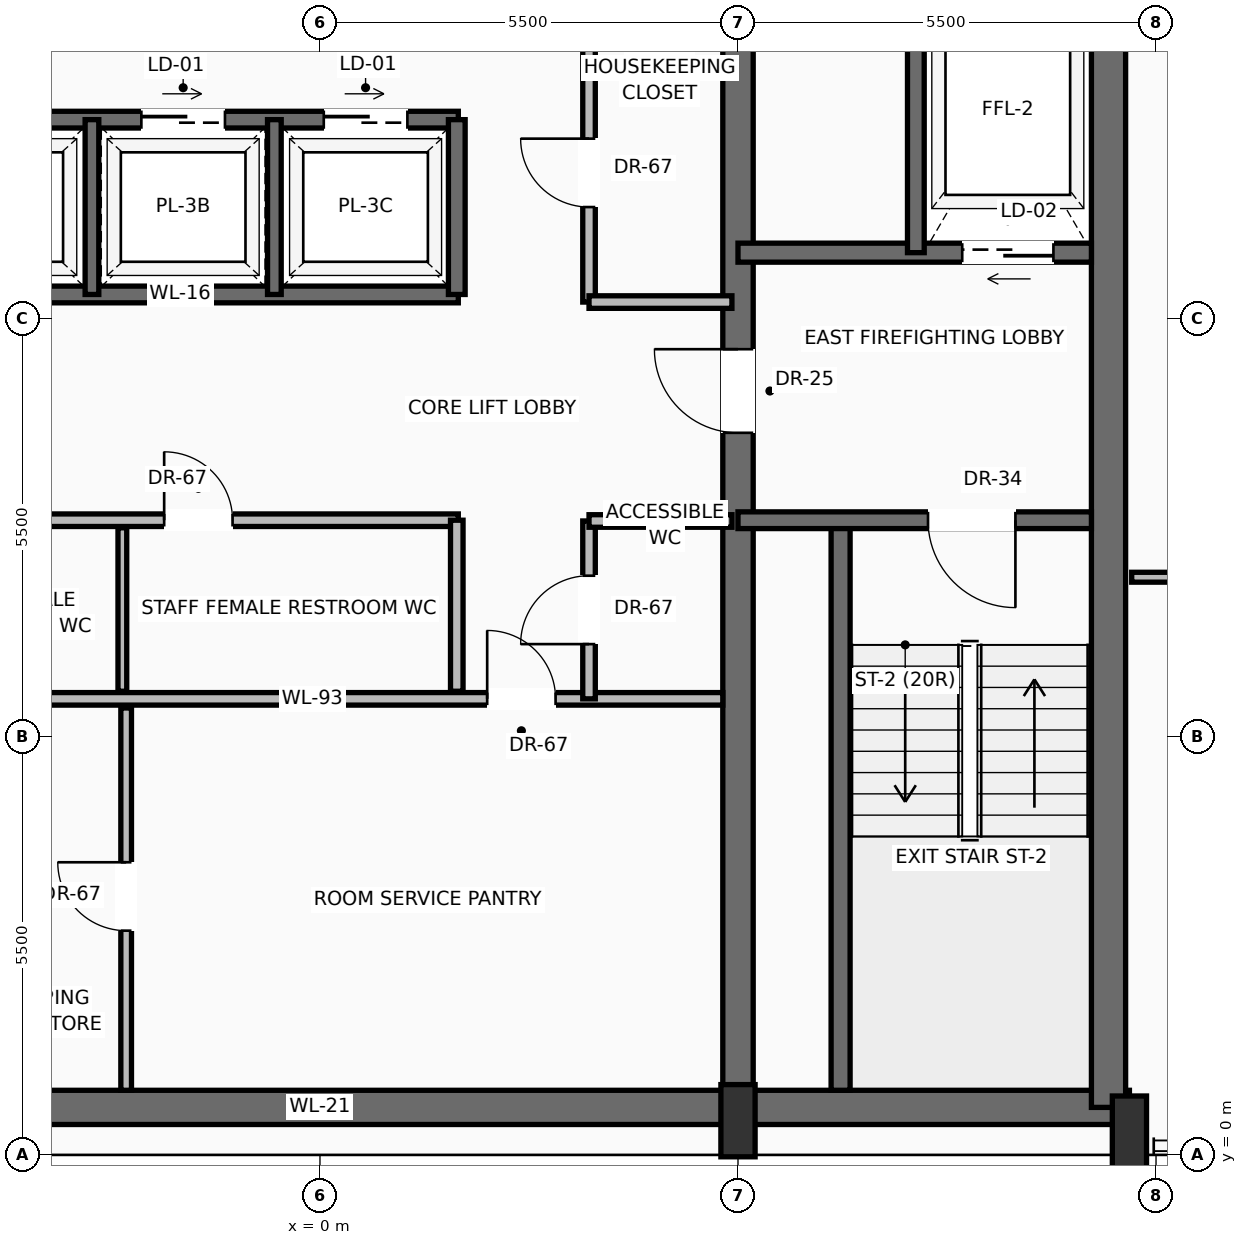
"""IFC4 building model, lengths in metres.
Left out: names, types, materials, properties, quantities, classifications, styles, units other than length and angle.
Written with IfcOpenShell. Run it as: python <this file> out.ifc"""

import sys

from ifc_helpers import new_model, si_unit, direction, frame, frame_2d, origin, origin_2d, place, context, subcontext, project, spatial, rectangle, extrude, source, transform, mapped, element, fill, save


model = new_model("IFC4")
c1 = context("Model", 3, precision=1e-05, world=origin(), true_north=direction((0.0, 1.0)))
c2 = subcontext(c1, "Body", "Model", "MODEL_VIEW")
j1 = project(units=[si_unit("LENGTHUNIT", "METRE"), si_unit("PLANEANGLEUNIT", "RADIAN")], contexts=[c1])
p1 = place(None, origin())
s1 = spatial("IfcSite", under=j1, at=p1, CompositionType="ELEMENT")
p2 = place(p1, origin())
s2 = spatial("IfcBuilding", under=s1, at=p2, CompositionType="ELEMENT")
p3 = place(p2, frame((0.0, 0.0, 262.65)))
s3 = spatial("IfcBuildingStorey", under=s2, at=p3, CompositionType="ELEMENT", Elevation=262.65)
p4 = place(p3, frame((-10.65, 0.625, 0.0), z_axis=(0.0, 0.0, 1.0), x_axis=(1.0, 0.0, 0.0)))
e1 = element("IfcWall", 1, at=p4, inside=s3, PredefinedType="SHEAR", context=c2, shape_type="SweptSolid", body=[
    extrude(rectangle(XDim=21.3, YDim=0.45, at=frame_2d((10.65, 0.0))), origin(), (0.0, 0.0, 1.0), 3.24),
])
p5 = place(p3, frame((10.375, 0.625, 0.0), z_axis=(0.0, 0.0, 1.0), x_axis=(0.0, 1.0, 0.0)))
e2 = element("IfcWall", 2, at=p5, inside=s3, PredefinedType="SHEAR", context=c2, shape_type="SweptSolid", body=[
    extrude(rectangle(XDim=15.35, YDim=0.45, at=frame_2d((7.675, 0.0))), origin(), (0.0, 0.0, 1.0), 3.24),
])
p6 = place(p3, frame((5.5, 0.625, 0.0), z_axis=(0.0, 0.0, 1.0), x_axis=(0.0, 1.0, 0.0)))
e3 = element("IfcWall", 3, at=p6, inside=s3, PredefinedType="SHEAR", context=c2, shape_type="SweptSolid", body=[
    extrude(rectangle(XDim=15.35, YDim=0.4, at=frame_2d((7.675, 0.0))), origin(), (0.0, 0.0, 1.0), 3.24),
])
p7 = place(p6, frame((8.875, 0.0, 0.0)))
e4 = element("IfcOpeningElement", 4, at=p7, cuts=e3, PredefinedType="OPENING", context=c2, shape_type="SweptSolid", body=[
    extrude(rectangle(XDim=1.1, YDim=2.2, at=frame_2d((0.55, 1.1))), frame((0.0, 0.21, 0.0), z_axis=(0.0, -1.0, 0.0), x_axis=(1.0, 0.0, 0.0)), (0.0, 0.0, 1.0), 0.42),
])
m1 = source(origin(), c2, "Body", "SweptSolid", [
    extrude(rectangle(XDim=0.45, YDim=0.95, at=origin_2d()), origin(), (0.0, 0.0, 1.0), 3.45),
])
for number, where, z_axis, x_axis in (
    (5, (5.5, 0.45, 0.0), (0.0, 0.0, 1.0), (1.0, 0.0, 0.0)),
    (6, (10.65, 0.3, 0.0), (0.0, 0.0, 1.0), (1.0, 0.0, 0.0)),
):
    element("IfcColumn", number, at=place(p3, frame(where, z_axis=z_axis, x_axis=x_axis)), inside=s3, PredefinedType="PILASTER", context=c2, shape_type="MappedRepresentation", body=[
        mapped(m1, transform((0.0, 0.0, 0.0), scale=1.0)),
    ])
p8 = place(p3, frame((6.85, 0.85, 0.0), z_axis=(0.0, 0.0, 1.0), x_axis=(0.0, 1.0, 0.0)))
e7 = element("IfcWall", 7, at=p8, inside=s3, PredefinedType="SOLIDWALL", context=c2, shape_type="SweptSolid", body=[
    extrude(rectangle(XDim=7.5, YDim=0.25, at=frame_2d((3.75, 0.0))), origin(), (0.0, 0.0, 1.0), 3.24),
])
p9 = place(p3, frame((10.15, 8.35, 0.0), z_axis=(0.0, 0.0, 1.0), x_axis=(-1.0, 0.0, 0.0)))
e8 = element("IfcWall", 8, at=p9, inside=s3, PredefinedType="SOLIDWALL", context=c2, shape_type="SweptSolid", body=[
    extrude(rectangle(XDim=4.65, YDim=0.22, at=frame_2d((2.325, 0.0))), origin(), (0.0, 0.0, 1.0), 3.24),
])
p10 = place(p9, frame((1.0, 0.0, 0.0)))
e9 = element("IfcOpeningElement", 9, at=p10, cuts=e8, PredefinedType="OPENING", context=c2, shape_type="SweptSolid", body=[
    extrude(rectangle(XDim=1.15, YDim=2.2, at=frame_2d((0.575, 1.1))), frame((0.0, 0.12, 0.0), z_axis=(0.0, -1.0, 0.0), x_axis=(1.0, 0.0, 0.0)), (0.0, 0.0, 1.0), 0.24),
])
p11 = place(p3, frame((10.15, 11.87, 0.0), z_axis=(0.0, 0.0, 1.0), x_axis=(-1.0, 0.0, 0.0)))
e10 = element("IfcWall", 10, at=p11, inside=s3, PredefinedType="SOLIDWALL", context=c2, shape_type="SweptSolid", body=[
    extrude(rectangle(XDim=4.65, YDim=0.25, at=frame_2d((2.325, 0.0))), origin(), (0.0, 0.0, 1.0), 3.24),
])
p12 = place(p11, frame((0.5, 0.0, 0.0)))
e11 = element("IfcOpeningElement", 11, at=p12, cuts=e10, PredefinedType="OPENING", context=c2, shape_type="SweptSolid", body=[
    extrude(rectangle(XDim=1.2, YDim=2.25, at=frame_2d((0.6, 1.125))), frame((0.0, 0.135, 0.0), z_axis=(0.0, -1.0, 0.0), x_axis=(1.0, 0.0, 0.0)), (0.0, 0.0, 1.0), 0.27),
])
p13 = place(p3, frame((7.84, 11.87, 0.0), z_axis=(0.0, 0.0, 1.0), x_axis=(0.0, 1.0, 0.0)))
e12 = element("IfcWall", 12, at=p13, inside=s3, PredefinedType="SOLIDWALL", context=c2, shape_type="SweptSolid", body=[
    extrude(rectangle(XDim=3.88, YDim=0.22, at=frame_2d((1.94, 0.0))), origin(), (0.0, 0.0, 1.0), 3.24),
])
p14 = place(p3, frame((-5.5, 6.0, 0.0), z_axis=(0.0, 0.0, 1.0), x_axis=(1.0, 0.0, 0.0)))
e13 = element("IfcWall", 13, at=p14, inside=s3, PredefinedType="PARTITIONING", context=c2, shape_type="SweptSolid", body=[
    extrude(rectangle(XDim=10.8, YDim=0.165, at=frame_2d((5.4, 0.0))), origin(), (0.0, 0.0, 1.0), 3.232),
])
p15 = place(p14, frame((7.7, 0.0, 0.0)))
e14 = element("IfcOpeningElement", 14, at=p15, cuts=e13, PredefinedType="OPENING", context=c2, shape_type="SweptSolid", body=[
    extrude(rectangle(XDim=0.9, YDim=2.1, at=frame_2d((0.45, 1.05))), frame((0.0, 0.093, 0.0), z_axis=(0.0, -1.0, 0.0), x_axis=(1.0, 0.0, 0.0)), (0.0, 0.0, 1.0), 0.185),
])
p16 = place(p3, frame((-2.55, 0.85, 0.0), z_axis=(0.0, 0.0, 1.0), x_axis=(0.0, 1.0, 0.0)))
e15 = element("IfcWall", 15, at=p16, inside=s3, PredefinedType="PARTITIONING", context=c2, shape_type="SweptSolid", body=[
    extrude(rectangle(XDim=5.03, YDim=0.14, at=frame_2d((2.515, 0.0))), origin(), (0.0, 0.0, 1.0), 3.232),
])
p17 = place(p16, frame((2.1, 0.0, 0.0)))
e16 = element("IfcOpeningElement", 16, at=p17, cuts=e15, PredefinedType="OPENING", context=c2, shape_type="SweptSolid", body=[
    extrude(rectangle(XDim=0.9, YDim=2.1, at=frame_2d((0.45, 1.05))), frame((0.0, 0.08, 0.0), z_axis=(0.0, -1.0, 0.0), x_axis=(1.0, 0.0, 0.0)), (0.0, 0.0, 1.0), 0.16),
])
p18 = place(p3, frame((3.54, 6.0, 0.0), z_axis=(0.0, 0.0, 1.0), x_axis=(0.0, 1.0, 0.0)))
e17 = element("IfcWall", 17, at=p18, inside=s3, PredefinedType="PARTITIONING", context=c2, shape_type="SweptSolid", body=[
    extrude(rectangle(XDim=2.34, YDim=0.165, at=frame_2d((1.17, 0.0))), origin(), (0.0, 0.0, 1.0), 3.232),
])
p19 = place(p18, frame((0.72, 0.0, 0.0)))
e18 = element("IfcOpeningElement", 18, at=p19, cuts=e17, PredefinedType="OPENING", context=c2, shape_type="SweptSolid", body=[
    extrude(rectangle(XDim=0.9, YDim=2.1, at=frame_2d((0.45, 1.05))), frame((0.0, 0.093, 0.0), z_axis=(0.0, -1.0, 0.0), x_axis=(1.0, 0.0, 0.0)), (0.0, 0.0, 1.0), 0.185),
])
p20 = place(p3, frame((3.54, 8.34, 0.0), z_axis=(0.0, 0.0, 1.0), x_axis=(1.0, 0.0, 0.0)))
e19 = element("IfcWall", 19, at=p20, inside=s3, PredefinedType="PARTITIONING", context=c2, shape_type="SweptSolid", body=[
    extrude(rectangle(XDim=1.88, YDim=0.165, at=frame_2d((0.94, 0.0))), origin(), (0.0, 0.0, 1.0), 3.232),
])
p21 = place(p3, frame((-5.3, 8.35, 0.0), z_axis=(0.0, 0.0, 1.0), x_axis=(1.0, 0.0, 0.0)))
e20 = element("IfcWall", 20, at=p21, inside=s3, PredefinedType="PARTITIONING", context=c2, shape_type="SweptSolid", body=[
    extrude(rectangle(XDim=7.12, YDim=0.165, at=frame_2d((3.56, 0.0))), origin(), (0.0, 0.0, 1.0), 3.232),
])
p22 = place(p21, frame((0.85, 0.0, 0.0)))
e21 = element("IfcOpeningElement", 21, at=p22, cuts=e20, PredefinedType="OPENING", context=c2, shape_type="SweptSolid", body=[
    extrude(rectangle(XDim=0.9, YDim=2.1, at=frame_2d((0.45, 1.05))), frame((0.0, 0.093, 0.0), z_axis=(0.0, -1.0, 0.0), x_axis=(1.0, 0.0, 0.0)), (0.0, 0.0, 1.0), 0.185),
])
p23 = place(p21, frame((3.25, 0.0, 0.0)))
e22 = element("IfcOpeningElement", 22, at=p23, cuts=e20, PredefinedType="OPENING", context=c2, shape_type="SweptSolid", body=[
    extrude(rectangle(XDim=0.9, YDim=2.1, at=frame_2d((0.45, 1.05))), frame((0.0, 0.093, 0.0), z_axis=(0.0, -1.0, 0.0), x_axis=(1.0, 0.0, 0.0)), (0.0, 0.0, 1.0), 0.185),
])
p24 = place(p3, frame((1.8, 6.1, 0.0), z_axis=(0.0, 0.0, 1.0), x_axis=(0.0, 1.0, 0.0)))
e23 = element("IfcWall", 23, at=p24, inside=s3, PredefinedType="PARTITIONING", context=c2, shape_type="SweptSolid", body=[
    extrude(rectangle(XDim=2.25, YDim=0.165, at=frame_2d((1.125, 0.0))), origin(), (0.0, 0.0, 1.0), 3.232),
])
p25 = place(p3, frame((-2.6, 6.1, 0.0), z_axis=(0.0, 0.0, 1.0), x_axis=(0.0, 1.0, 0.0)))
e24 = element("IfcWall", 24, at=p25, inside=s3, PredefinedType="PARTITIONING", context=c2, shape_type="SweptSolid", body=[
    extrude(rectangle(XDim=2.15, YDim=0.115, at=frame_2d((1.075, 0.0))), origin(), (0.0, 0.0, 1.0), 3.232),
])
p26 = place(p3, frame((-5.5, 11.32, 0.0), z_axis=(0.0, 0.0, 1.0), x_axis=(1.0, 0.0, 0.0)))
e25 = element("IfcWall", 25, at=p26, inside=s3, PredefinedType="SOLIDWALL", context=c2, shape_type="SweptSolid", body=[
    extrude(rectangle(XDim=7.32, YDim=0.22, at=frame_2d((3.66, 0.0))), origin(), (0.0, 0.0, 1.0), 3.24),
])
p27 = place(p3, frame((-5.5, 13.62, 0.0), z_axis=(0.0, 0.0, 1.0), x_axis=(1.0, 0.0, 0.0)))
e26 = element("IfcWall", 26, at=p27, inside=s3, PredefinedType="SOLIDWALL", context=c2, shape_type="SweptSolid", body=[
    extrude(rectangle(XDim=7.32, YDim=0.22, at=frame_2d((3.66, 0.0))), origin(), (0.0, 0.0, 1.0), 3.24),
])
p28 = place(p27, frame((0.75, 0.0, 0.0)))
e27 = element("IfcOpeningElement", 27, at=p28, cuts=e26, PredefinedType="OPENING", context=c2, shape_type="SweptSolid", body=[
    extrude(rectangle(XDim=1.1, YDim=2.2, at=frame_2d((0.55, 1.1))), frame((0.0, 0.12, 0.0), z_axis=(0.0, -1.0, 0.0), x_axis=(1.0, 0.0, 0.0)), (0.0, 0.0, 1.0), 0.24),
])
p29 = place(p27, frame((3.15, 0.0, 0.0)))
e28 = element("IfcOpeningElement", 28, at=p29, cuts=e26, PredefinedType="OPENING", context=c2, shape_type="SweptSolid", body=[
    extrude(rectangle(XDim=1.1, YDim=2.2, at=frame_2d((0.55, 1.1))), frame((0.0, 0.12, 0.0), z_axis=(0.0, -1.0, 0.0), x_axis=(1.0, 0.0, 0.0)), (0.0, 0.0, 1.0), 0.24),
])
p30 = place(p27, frame((5.55, 0.0, 0.0)))
e29 = element("IfcOpeningElement", 29, at=p30, cuts=e26, PredefinedType="OPENING", context=c2, shape_type="SweptSolid", body=[
    extrude(rectangle(XDim=1.1, YDim=2.2, at=frame_2d((0.55, 1.1))), frame((0.0, 0.12, 0.0), z_axis=(0.0, -1.0, 0.0), x_axis=(1.0, 0.0, 0.0)), (0.0, 0.0, 1.0), 0.24),
])
p31 = place(p3, frame((1.8, 11.32, 0.0), z_axis=(0.0, 0.0, 1.0), x_axis=(0.0, 1.0, 0.0)))
e30 = element("IfcWall", 30, at=p31, inside=s3, PredefinedType="SOLIDWALL", context=c2, shape_type="SweptSolid", body=[
    extrude(rectangle(XDim=2.3, YDim=0.22, at=frame_2d((1.15, 0.0))), origin(), (0.0, 0.0, 1.0), 3.24),
])
for number, where, z_axis, x_axis in (
    (31, (-3.0, 11.32, 0.0), (0.0, 0.0, 1.0), (0.0, 1.0, 0.0)),
    (32, (-0.6, 11.32, 0.0), (0.0, 0.0, 1.0), (0.0, 1.0, 0.0)),
):
    element("IfcWall", number, at=place(p3, frame(where, z_axis=z_axis, x_axis=x_axis)), inside=s3, PredefinedType="SOLIDWALL", context=c2, shape_type="SweptSolid", body=[
        extrude(rectangle(XDim=2.3, YDim=0.18, at=frame_2d((1.15, 0.0))), origin(), (0.0, 0.0, 1.0), 3.24),
    ])
p32 = place(p3, frame((3.54, 11.22, 0.0), z_axis=(0.0, 0.0, 1.0), x_axis=(0.0, 1.0, 0.0)))
e33 = element("IfcWall", 33, at=p32, inside=s3, PredefinedType="PARTITIONING", context=c2, shape_type="SweptSolid", body=[
    extrude(rectangle(XDim=4.53, YDim=0.165, at=frame_2d((2.265, 0.0))), origin(), (0.0, 0.0, 1.0), 3.232),
])
p33 = place(p32, frame((1.25, 0.0, 0.0)))
e34 = element("IfcOpeningElement", 34, at=p33, cuts=e33, PredefinedType="OPENING", context=c2, shape_type="SweptSolid", body=[
    extrude(rectangle(XDim=0.9, YDim=2.1, at=frame_2d((0.45, 1.05))), frame((0.0, 0.093, 0.0), z_axis=(0.0, -1.0, 0.0), x_axis=(1.0, 0.0, 0.0)), (0.0, 0.0, 1.0), 0.185),
])
p34 = place(p3, frame((3.54, 11.22, 0.0), z_axis=(0.0, 0.0, 1.0), x_axis=(1.0, 0.0, 0.0)))
e35 = element("IfcWall", 35, at=p34, inside=s3, PredefinedType="PARTITIONING", context=c2, shape_type="SweptSolid", body=[
    extrude(rectangle(XDim=1.88, YDim=0.165, at=frame_2d((0.94, 0.0))), origin(), (0.0, 0.0, 1.0), 3.232),
])
p35 = place(p3, frame((10.68, 7.6, 0.0), z_axis=(0.0, 0.0, 1.0), x_axis=(1.0, 0.0, 0.0)))
e36 = element("IfcWall", 36, at=p35, inside=s3, PredefinedType="PARTITIONING", context=c2, shape_type="SweptSolid", body=[
    extrude(rectangle(XDim=12.147, YDim=0.13, at=frame_2d((6.074, 0.0))), origin(), (0.0, 0.0, 1.0), 3.232),
])
p36 = place(p35, frame((5.025, 0.0, 0.0)))
e37 = element("IfcOpeningElement", 37, at=p36, cuts=e36, PredefinedType="OPENING", context=c2, shape_type="SweptSolid", body=[
    extrude(rectangle(XDim=0.95, YDim=2.2, at=frame_2d((0.475, 1.1))), frame((0.0, 0.075, 0.0), z_axis=(0.0, -1.0, 0.0), x_axis=(1.0, 0.0, 0.0)), (0.0, 0.0, 1.0), 0.15),
])
m2 = source(origin(), c2, "Body", "SweptSolid", [
    extrude(rectangle(XDim=1.15, YDim=2.2, at=frame_2d((0.575, 1.1))), frame((0.0, 0.025, 0.0), z_axis=(0.0, -1.0, 0.0), x_axis=(1.0, 0.0, 0.0)), (0.0, 0.0, 1.0), 0.05),
])
p37 = place(p10, origin())
e38 = element("IfcDoor", 38, at=p37, inside=s3, OperationType="SINGLE_SWING_LEFT", PredefinedType="DOOR", context=c2, shape_type="MappedRepresentation", body=[
    mapped(m2, transform((0.0, 0.0, 0.0), scale=1.0)),
])
fill(e9, e38)
m3 = source(origin(), c2, "Body", "SweptSolid", [
    extrude(rectangle(XDim=1.1, YDim=2.2, at=frame_2d((0.55, 1.1))), frame((0.0, 0.025, 0.0), z_axis=(0.0, -1.0, 0.0), x_axis=(1.0, 0.0, 0.0)), (0.0, 0.0, 1.0), 0.05),
])
p38 = place(p7, origin())
e39 = element("IfcDoor", 39, at=p38, inside=s3, OperationType="SINGLE_SWING_RIGHT", PredefinedType="DOOR", context=c2, shape_type="MappedRepresentation", body=[
    mapped(m3, transform((0.0, 0.0, 0.0), scale=1.0)),
])
fill(e4, e39)
m4 = source(origin(), c2, "Body", "SweptSolid", [
    extrude(rectangle(XDim=1.2, YDim=2.25, at=frame_2d((0.6, 1.125))), frame((0.0, 0.025, 0.0), z_axis=(0.0, -1.0, 0.0), x_axis=(1.0, 0.0, 0.0)), (0.0, 0.0, 1.0), 0.05),
])
p39 = place(p12, origin())
e40 = element("IfcDoor", 40, at=p39, inside=s3, OperationType="SLIDING_TO_RIGHT", PredefinedType="DOOR", context=c2, shape_type="MappedRepresentation", body=[
    mapped(m4, transform((0.0, 0.0, 0.0), scale=1.0)),
])
fill(e11, e40)
m5 = source(origin(), c2, "Body", "SweptSolid", [
    extrude(rectangle(XDim=0.9, YDim=2.1, at=frame_2d((0.45, 1.05))), frame((0.0, 0.025, 0.0), z_axis=(0.0, -1.0, 0.0), x_axis=(1.0, 0.0, 0.0)), (0.0, 0.0, 1.0), 0.05),
])
p40 = place(p15, origin())
e41 = element("IfcDoor", 41, at=p40, inside=s3, OperationType="SINGLE_SWING_LEFT", PredefinedType="DOOR", context=c2, shape_type="MappedRepresentation", body=[
    mapped(m5, transform((0.0, 0.0, 0.0), scale=1.0)),
])
fill(e14, e41)
p41 = place(p17, origin())
e42 = element("IfcDoor", 42, at=p41, inside=s3, OperationType="SINGLE_SWING_RIGHT", PredefinedType="DOOR", context=c2, shape_type="MappedRepresentation", body=[
    mapped(m5, transform((0.0, 0.0, 0.0), scale=1.0)),
])
fill(e16, e42)
p42 = place(p19, origin())
e43 = element("IfcDoor", 43, at=p42, inside=s3, OperationType="SINGLE_SWING_LEFT", PredefinedType="DOOR", context=c2, shape_type="MappedRepresentation", body=[
    mapped(m5, transform((0.0, 0.0, 0.0), scale=1.0)),
])
fill(e18, e43)
p43 = place(p23, origin())
e44 = element("IfcDoor", 44, at=p43, inside=s3, OperationType="SINGLE_SWING_LEFT", PredefinedType="DOOR", context=c2, shape_type="MappedRepresentation", body=[
    mapped(m5, transform((0.0, 0.0, 0.0), scale=1.0)),
])
fill(e22, e44)
m6 = source(origin(), c2, "Body", "SweptSolid", [
    extrude(rectangle(XDim=1.1, YDim=2.2, at=frame_2d((0.55, 1.1))), frame((0.0, 0.025, 0.0), z_axis=(0.0, -1.0, 0.0), x_axis=(1.0, 0.0, 0.0)), (0.0, 0.0, 1.0), 0.05),
])
p44 = place(p29, origin())
e45 = element("IfcDoor", 45, at=p44, inside=s3, OperationType="SLIDING_TO_RIGHT", PredefinedType="DOOR", context=c2, shape_type="MappedRepresentation", body=[
    mapped(m6, transform((0.0, 0.0, 0.0), scale=1.0)),
])
fill(e28, e45)
p45 = place(p30, origin())
e46 = element("IfcDoor", 46, at=p45, inside=s3, OperationType="SLIDING_TO_RIGHT", PredefinedType="DOOR", context=c2, shape_type="MappedRepresentation", body=[
    mapped(m6, transform((0.0, 0.0, 0.0), scale=1.0)),
])
fill(e29, e46)
p46 = place(p33, origin())
e47 = element("IfcDoor", 47, at=p46, inside=s3, OperationType="SINGLE_SWING_RIGHT", PredefinedType="DOOR", context=c2, shape_type="MappedRepresentation", body=[
    mapped(m5, transform((0.0, 0.0, 0.0), scale=1.0)),
])
fill(e34, e47)
save(model, sys.argv[1])
